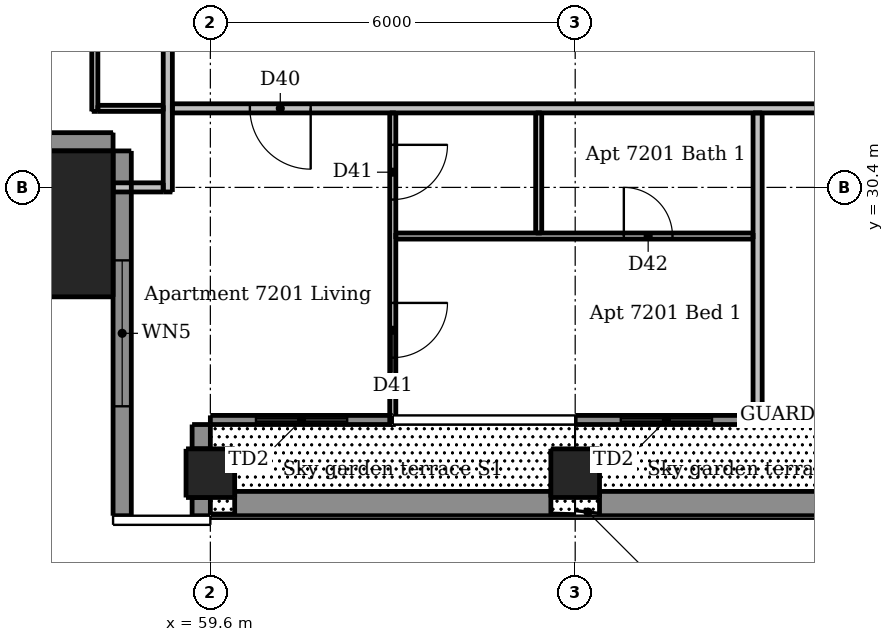
"""IFC4 building model, lengths in metres.
Left out: names, types, materials, properties, quantities, classifications, styles, units other than length and angle.
Written with IfcOpenShell. Run it as: python <this file> out.ifc"""

import sys

from ifc_helpers import new_model, si_unit, direction, frame, frame_2d, origin, origin_2d, place, context, subcontext, project, spatial, rectangle, extrude, element, fill, save


model = new_model("IFC4")
c1 = context("Model", 3, precision=1e-05, world=origin(), true_north=direction((0.0, 1.0)))
c2 = subcontext(c1, "Body", "Model", "MODEL_VIEW")
j1 = project(units=[si_unit("LENGTHUNIT", "METRE"), si_unit("PLANEANGLEUNIT", "RADIAN")], contexts=[c1])
p1 = place(None, origin())
s1 = spatial("IfcSite", under=j1, at=p1, CompositionType="ELEMENT")
p2 = place(p1, origin())
s2 = spatial("IfcBuilding", under=s1, at=p2, CompositionType="ELEMENT")
p3 = place(p2, frame((0.0, 0.0, 268.6)))
s3 = spatial("IfcBuildingStorey", under=s2, at=p3, CompositionType="ELEMENT", Elevation=268.6)
p4 = place(p3, frame((59.6, 25.7, 0.0), z_axis=(0.0, 0.0, 1.0), x_axis=(1.0, 0.0, 0.0)))
e1 = element("IfcColumn", 1, at=p4, inside=s3, PredefinedType="COLUMN", context=c2, shape_type="SweptSolid", body=[
    extrude(rectangle(XDim=0.8, YDim=0.8, at=origin_2d()), origin(), (0.0, 0.0, 1.0), 3.05),
])
p5 = place(p3, frame((65.6, 25.7, 0.0), z_axis=(0.0, 0.0, 1.0), x_axis=(1.0, 0.0, 0.0)))
e2 = element("IfcColumn", 2, at=p5, inside=s3, PredefinedType="COLUMN", context=c2, shape_type="SweptSolid", body=[
    extrude(rectangle(XDim=0.8, YDim=0.8, at=origin_2d()), origin(), (0.0, 0.0, 1.0), 3.3),
])
p6 = place(p3, frame((56.8, 29.8, 0.0), z_axis=(0.0, 0.0, 1.0), x_axis=(1.0, 0.0, 0.0)))
e3 = element("IfcColumn", 3, at=p6, inside=s3, PredefinedType="COLUMN", context=c2, shape_type="SweptSolid", body=[
    extrude(rectangle(XDim=2.4, YDim=2.4, at=origin_2d()), origin(), (0.0, 0.0, 1.0), 3.3),
])
p7 = place(p3, frame((59.45, 25.0, 0.0), z_axis=(0.0, 0.0, 1.0), x_axis=(0.0, 1.0, 0.0)))
e4 = element("IfcWall", 4, at=p7, inside=s3, PredefinedType="SOLIDWALL", context=c2, shape_type="SweptSolid", body=[
    extrude(rectangle(XDim=0.3, YDim=0.3, at=frame_2d((0.15, 0.0))), origin(), (0.0, 0.0, 1.0), 3.05),
])
p8 = place(p3, frame((59.45, 26.1, 0.0), z_axis=(0.0, 0.0, 1.0), x_axis=(0.0, 1.0, 0.0)))
e5 = element("IfcWall", 5, at=p8, inside=s3, PredefinedType="SOLIDWALL", context=c2, shape_type="SweptSolid", body=[
    extrude(rectangle(XDim=0.4, YDim=0.3, at=frame_2d((0.2, 0.0))), origin(), (0.0, 0.0, 1.0), 3.05),
])
p9 = place(p3, frame((53.0, 31.15, 0.0), z_axis=(0.0, 0.0, 1.0), x_axis=(1.0, 0.0, 0.0)))
e6 = element("IfcWall", 6, at=p9, inside=s3, PredefinedType="SOLIDWALL", context=c2, shape_type="SweptSolid", body=[
    extrude(rectangle(XDim=5.0, YDim=0.3, at=frame_2d((2.5, 0.0))), origin(), (0.0, 0.0, 1.0), 3.05),
])
p10 = place(p3, frame((58.15, 31.0, 0.0), z_axis=(0.0, 0.0, 1.0), x_axis=(0.0, -1.0, 0.0)))
e7 = element("IfcWall", 7, at=p10, inside=s3, PredefinedType="SOLIDWALL", context=c2, shape_type="SweptSolid", body=[
    extrude(rectangle(XDim=6.0, YDim=0.3, at=frame_2d((3.0, 0.0))), origin(), (0.0, 0.0, 1.0), 3.05),
])
p11 = place(p10, frame((1.8, 0.0, 0.15)))
e8 = element("IfcOpeningElement", 8, at=p11, cuts=e7, PredefinedType="OPENING", context=c2, shape_type="SweptSolid", body=[
    extrude(rectangle(XDim=2.4, YDim=2.1, at=frame_2d((1.2, 1.05))), frame((0.0, 0.16, 0.0), z_axis=(0.0, -1.0, 0.0), x_axis=(1.0, 0.0, 0.0)), (0.0, 0.0, 1.0), 0.32),
])
p12 = place(p3, frame((59.6, 26.575, 0.0), z_axis=(0.0, 0.0, 1.0), x_axis=(1.0, 0.0, 0.0)))
e9 = element("IfcWall", 9, at=p12, inside=s3, PredefinedType="SOLIDWALL", context=c2, shape_type="SweptSolid", body=[
    extrude(rectangle(XDim=3.0, YDim=0.15, at=frame_2d((1.5, 0.0))), origin(), (0.0, 0.0, 1.0), 3.05),
])
p13 = place(p12, frame((0.75, 0.0, 0.0)))
e10 = element("IfcOpeningElement", 10, at=p13, cuts=e9, PredefinedType="OPENING", context=c2, shape_type="SweptSolid", body=[
    extrude(rectangle(XDim=1.5, YDim=2.4, at=frame_2d((0.75, 1.2))), frame((0.0, 0.085, 0.0), z_axis=(0.0, -1.0, 0.0), x_axis=(1.0, 0.0, 0.0)), (0.0, 0.0, 1.0), 0.17),
])
p14 = place(p3, frame((65.6, 26.575, 0.0), z_axis=(0.0, 0.0, 1.0), x_axis=(1.0, 0.0, 0.0)))
e11 = element("IfcWall", 11, at=p14, inside=s3, PredefinedType="SOLIDWALL", context=c2, shape_type="SweptSolid", body=[
    extrude(rectangle(XDim=3.0, YDim=0.15, at=frame_2d((1.5, 0.0))), origin(), (0.0, 0.0, 1.0), 3.05),
])
p15 = place(p14, frame((0.75, 0.0, 0.0)))
e12 = element("IfcOpeningElement", 12, at=p15, cuts=e11, PredefinedType="OPENING", context=c2, shape_type="SweptSolid", body=[
    extrude(rectangle(XDim=1.5, YDim=2.4, at=frame_2d((0.75, 1.2))), frame((0.0, 0.085, 0.0), z_axis=(0.0, -1.0, 0.0), x_axis=(1.0, 0.0, 0.0)), (0.0, 0.0, 1.0), 0.17),
])
for number, where, z_axis, x_axis in (
    (13, (60.0, 25.2, 0.03), (0.0, 0.0, 1.0), (1.0, 0.0, 0.0)),
    (14, (66.0, 25.2, 0.03), (0.0, 0.0, 1.0), (1.0, 0.0, 0.0)),
):
    element("IfcWall", number, at=place(p3, frame(where, z_axis=z_axis, x_axis=x_axis)), inside=s3, PredefinedType="PARAPET", context=c2, shape_type="SweptSolid", body=[
        extrude(rectangle(XDim=5.2, YDim=0.4, at=frame_2d((2.6, 0.0))), origin(), (0.0, 0.0, 1.0), 1.1),
    ])
p16 = place(p3, frame((57.7, 31.65, 0.0), z_axis=(0.0, 0.0, 1.0), x_axis=(0.0, 1.0, 0.0)))
e15 = element("IfcWall", 15, at=p16, inside=s3, PredefinedType="PARTITIONING", context=c2, shape_type="SweptSolid", body=[
    extrude(rectangle(XDim=16.675, YDim=0.1, at=frame_2d((8.337, 0.0))), origin(), (0.0, 0.0, 1.0), 3.05),
])
p17 = place(p16, frame((2.55, 0.0, 0.0)))
e16 = element("IfcOpeningElement", 16, at=p17, cuts=e15, PredefinedType="OPENING", context=c2, shape_type="SweptSolid", body=[
    extrude(rectangle(XDim=0.9, YDim=2.1, at=frame_2d((0.45, 1.05))), frame((0.0, 0.06, 0.0), z_axis=(0.0, -1.0, 0.0), x_axis=(1.0, 0.0, 0.0)), (0.0, 0.0, 1.0), 0.12),
])
p18 = place(p16, frame((8.8, 0.0, 0.0)))
e17 = element("IfcOpeningElement", 17, at=p18, cuts=e15, PredefinedType="OPENING", context=c2, shape_type="SweptSolid", body=[
    extrude(rectangle(XDim=0.9, YDim=2.1, at=frame_2d((0.45, 1.05))), frame((0.0, 0.06, 0.0), z_axis=(0.0, -1.0, 0.0), x_axis=(1.0, 0.0, 0.0)), (0.0, 0.0, 1.0), 0.12),
])
p19 = place(p16, frame((6.4, 0.0, 0.0)))
e18 = element("IfcOpeningElement", 18, at=p19, cuts=e15, PredefinedType="OPENING", context=c2, shape_type="SweptSolid", body=[
    extrude(rectangle(XDim=0.9, YDim=2.1, at=frame_2d((0.45, 1.05))), frame((0.0, 0.06, 0.0), z_axis=(0.0, -1.0, 0.0), x_axis=(1.0, 0.0, 0.0)), (0.0, 0.0, 1.0), 0.12),
])
p20 = place(p16, frame((14.5, 0.0, 0.0)))
e19 = element("IfcOpeningElement", 19, at=p20, cuts=e15, PredefinedType="OPENING", context=c2, shape_type="SweptSolid", body=[
    extrude(rectangle(XDim=0.9, YDim=2.1, at=frame_2d((0.45, 1.05))), frame((0.0, 0.06, 0.0), z_axis=(0.0, -1.0, 0.0), x_axis=(1.0, 0.0, 0.0)), (0.0, 0.0, 1.0), 0.12),
])
p21 = place(p16, frame((11.55, 0.0, 0.0)))
e20 = element("IfcOpeningElement", 20, at=p21, cuts=e15, PredefinedType="OPENING", context=c2, shape_type="SweptSolid", body=[
    extrude(rectangle(XDim=0.8, YDim=2.1, at=frame_2d((0.4, 1.05))), frame((0.0, 0.06, 0.0), z_axis=(0.0, -1.0, 0.0), x_axis=(1.0, 0.0, 0.0)), (0.0, 0.0, 1.0), 0.12),
])
p22 = place(p3, frame((62.6, 31.625, 0.0), z_axis=(0.0, 0.0, 1.0), x_axis=(0.0, -1.0, 0.0)))
e21 = element("IfcWall", 21, at=p22, inside=s3, PredefinedType="PARTITIONING", context=c2, shape_type="SweptSolid", body=[
    extrude(rectangle(XDim=5.125, YDim=0.1, at=frame_2d((2.562, 0.0))), origin(), (0.0, 0.0, 1.0), 3.05),
])
p23 = place(p22, frame((0.525, 0.0, 0.0)))
e22 = element("IfcOpeningElement", 22, at=p23, cuts=e21, PredefinedType="OPENING", context=c2, shape_type="SweptSolid", body=[
    extrude(rectangle(XDim=0.9, YDim=2.1, at=frame_2d((0.45, 1.05))), frame((0.0, 0.06, 0.0), z_axis=(0.0, -1.0, 0.0), x_axis=(1.0, 0.0, 0.0)), (0.0, 0.0, 1.0), 0.12),
])
p24 = place(p22, frame((3.125, 0.0, 0.0)))
e23 = element("IfcOpeningElement", 23, at=p24, cuts=e21, PredefinedType="OPENING", context=c2, shape_type="SweptSolid", body=[
    extrude(rectangle(XDim=0.9, YDim=2.1, at=frame_2d((0.45, 1.05))), frame((0.0, 0.06, 0.0), z_axis=(0.0, -1.0, 0.0), x_axis=(1.0, 0.0, 0.0)), (0.0, 0.0, 1.0), 0.12),
])
p25 = place(p3, frame((65.0, 29.65, 0.0), z_axis=(0.0, 0.0, 1.0), x_axis=(0.0, 1.0, 0.0)))
e24 = element("IfcWall", 24, at=p25, inside=s3, PredefinedType="PARTITIONING", context=c2, shape_type="SweptSolid", body=[
    extrude(rectangle(XDim=1.975, YDim=0.1, at=frame_2d((0.988, 0.0))), origin(), (0.0, 0.0, 1.0), 3.05),
])
p26 = place(p3, frame((57.75, 31.7, 0.0), z_axis=(0.0, 0.0, 1.0), x_axis=(1.0, 0.0, 0.0)))
e25 = element("IfcWall", 25, at=p26, inside=s3, PredefinedType="PARTITIONING", context=c2, shape_type="SweptSolid", body=[
    extrude(rectangle(XDim=1.075, YDim=0.1, at=frame_2d((0.538, 0.0))), origin(), (0.0, 0.0, 1.0), 3.05),
])
p27 = place(p3, frame((62.65, 29.6, 0.0), z_axis=(0.0, 0.0, 1.0), x_axis=(1.0, 0.0, 0.0)))
e26 = element("IfcWall", 26, at=p27, inside=s3, PredefinedType="PARTITIONING", context=c2, shape_type="SweptSolid", body=[
    extrude(rectangle(XDim=5.875, YDim=0.1, at=frame_2d((2.938, 0.0))), origin(), (0.0, 0.0, 1.0), 3.05),
])
p28 = place(p27, frame((3.75, 0.0, 0.0)))
e27 = element("IfcOpeningElement", 27, at=p28, cuts=e26, PredefinedType="OPENING", context=c2, shape_type="SweptSolid", body=[
    extrude(rectangle(XDim=0.8, YDim=2.1, at=frame_2d((0.4, 1.05))), frame((0.0, 0.06, 0.0), z_axis=(0.0, -1.0, 0.0), x_axis=(1.0, 0.0, 0.0)), (0.0, 0.0, 1.0), 0.12),
])
p29 = place(p3, frame((58.9, 30.325, 0.0), z_axis=(0.0, 0.0, 1.0), x_axis=(0.0, 1.0, 0.0)))
e28 = element("IfcWall", 28, at=p29, inside=s3, PredefinedType="PARTITIONING", context=c2, shape_type="SweptSolid", body=[
    extrude(rectangle(XDim=30.85, YDim=0.15, at=frame_2d((15.425, 0.0))), origin(), (0.0, 0.0, 1.0), 3.05),
])
p30 = place(p29, frame((9.225, 0.0, 0.0)))
e29 = element("IfcOpeningElement", 29, at=p30, cuts=e28, PredefinedType="OPENING", context=c2, shape_type="SweptSolid", body=[
    extrude(rectangle(XDim=1.0, YDim=2.1, at=frame_2d((0.5, 1.05))), frame((0.0, 0.085, 0.0), z_axis=(0.0, -1.0, 0.0), x_axis=(1.0, 0.0, 0.0)), (0.0, 0.0, 1.0), 0.17),
])
p31 = place(p29, frame((26.925, 0.0, 0.0)))
e30 = element("IfcOpeningElement", 30, at=p31, cuts=e28, PredefinedType="OPENING", context=c2, shape_type="SweptSolid", body=[
    extrude(rectangle(XDim=1.0, YDim=2.1, at=frame_2d((0.5, 1.05))), frame((0.0, 0.085, 0.0), z_axis=(0.0, -1.0, 0.0), x_axis=(1.0, 0.0, 0.0)), (0.0, 0.0, 1.0), 0.17),
])
p32 = place(p3, frame((68.6, 26.5, 0.0), z_axis=(0.0, 0.0, 1.0), x_axis=(0.0, 1.0, 0.0)))
e31 = element("IfcWall", 31, at=p32, inside=s3, PredefinedType="PARTITIONING", context=c2, shape_type="SweptSolid", body=[
    extrude(rectangle(XDim=5.125, YDim=0.15, at=frame_2d((2.562, 0.0))), origin(), (0.0, 0.0, 1.0), 3.05),
])
p33 = place(p3, frame((89.525, 31.7, 0.0), z_axis=(0.0, 0.0, 1.0), x_axis=(-1.0, 0.0, 0.0)))
e32 = element("IfcWall", 32, at=p33, inside=s3, PredefinedType="PARTITIONING", context=c2, shape_type="SweptSolid", body=[
    extrude(rectangle(XDim=30.55, YDim=0.15, at=frame_2d((15.275, 0.0))), origin(), (0.0, 0.0, 1.0), 3.05),
])
p34 = place(p33, frame((28.275, 0.0, 0.0)))
e33 = element("IfcOpeningElement", 33, at=p34, cuts=e32, PredefinedType="OPENING", context=c2, shape_type="SweptSolid", body=[
    extrude(rectangle(XDim=1.0, YDim=2.1, at=frame_2d((0.5, 1.05))), frame((0.0, 0.085, 0.0), z_axis=(0.0, -1.0, 0.0), x_axis=(1.0, 0.0, 0.0)), (0.0, 0.0, 1.0), 0.17),
])
p35 = place(p33, frame((11.425, 0.0, 0.0)))
e34 = element("IfcOpeningElement", 34, at=p35, cuts=e32, PredefinedType="OPENING", context=c2, shape_type="SweptSolid", body=[
    extrude(rectangle(XDim=1.0, YDim=2.1, at=frame_2d((0.5, 1.05))), frame((0.0, 0.085, 0.0), z_axis=(0.0, -1.0, 0.0), x_axis=(1.0, 0.0, 0.0)), (0.0, 0.0, 1.0), 0.17),
])
p36 = place(p3, frame((58.0, 30.4, 0.0), z_axis=(0.0, 0.0, 1.0), x_axis=(1.0, 0.0, 0.0)))
e35 = element("IfcWall", 35, at=p36, inside=s3, PredefinedType="PARTITIONING", context=c2, shape_type="SweptSolid", body=[
    extrude(rectangle(XDim=0.825, YDim=0.15, at=frame_2d((0.413, 0.0))), origin(), (0.0, 0.0, 1.0), 3.05),
])
p37 = place(p11, origin())
e36 = element("IfcWindow", 36, at=p37, inside=s3, PartitioningType="DOUBLE_PANEL_VERTICAL", PredefinedType="WINDOW", context=c2, shape_type="SweptSolid", body=[
    extrude(rectangle(XDim=2.4, YDim=2.1, at=frame_2d((1.2, 1.05))), frame((0.0, 0.03, 0.0), z_axis=(0.0, -1.0, 0.0), x_axis=(1.0, 0.0, 0.0)), (0.0, 0.0, 1.0), 0.06),
])
fill(e8, e36)
p38 = place(p13, origin())
e37 = element("IfcDoor", 37, at=p38, inside=s3, OperationType="DOUBLE_DOOR_SLIDING", PredefinedType="DOOR", context=c2, shape_type="SweptSolid", body=[
    extrude(rectangle(XDim=1.5, YDim=2.4, at=frame_2d((0.75, 1.2))), frame((0.0, 0.025, 0.0), z_axis=(0.0, -1.0, 0.0), x_axis=(1.0, 0.0, 0.0)), (0.0, 0.0, 1.0), 0.05),
])
fill(e10, e37)
p39 = place(p15, origin())
e38 = element("IfcDoor", 38, at=p39, inside=s3, OperationType="DOUBLE_DOOR_SLIDING", PredefinedType="DOOR", context=c2, shape_type="SweptSolid", body=[
    extrude(rectangle(XDim=1.5, YDim=2.4, at=frame_2d((0.75, 1.2))), frame((0.0, 0.025, 0.0), z_axis=(0.0, -1.0, 0.0), x_axis=(1.0, 0.0, 0.0)), (0.0, 0.0, 1.0), 0.05),
])
fill(e12, e38)
p40 = place(p34, origin())
e39 = element("IfcDoor", 39, at=p40, inside=s3, OperationType="SINGLE_SWING_LEFT", PredefinedType="DOOR", context=c2, shape_type="SweptSolid", body=[
    extrude(rectangle(XDim=1.0, YDim=2.1, at=frame_2d((0.5, 1.05))), frame((0.0, 0.025, 0.0), z_axis=(0.0, -1.0, 0.0), x_axis=(1.0, 0.0, 0.0)), (0.0, 0.0, 1.0), 0.05),
])
fill(e33, e39)
p41 = place(p23, origin())
e40 = element("IfcDoor", 40, at=p41, inside=s3, OperationType="SINGLE_SWING_LEFT", PredefinedType="DOOR", context=c2, shape_type="SweptSolid", body=[
    extrude(rectangle(XDim=0.9, YDim=2.1, at=frame_2d((0.45, 1.05))), frame((0.0, 0.025, 0.0), z_axis=(0.0, -1.0, 0.0), x_axis=(1.0, 0.0, 0.0)), (0.0, 0.0, 1.0), 0.05),
])
fill(e22, e40)
p42 = place(p24, origin())
e41 = element("IfcDoor", 41, at=p42, inside=s3, OperationType="SINGLE_SWING_LEFT", PredefinedType="DOOR", context=c2, shape_type="SweptSolid", body=[
    extrude(rectangle(XDim=0.9, YDim=2.1, at=frame_2d((0.45, 1.05))), frame((0.0, 0.025, 0.0), z_axis=(0.0, -1.0, 0.0), x_axis=(1.0, 0.0, 0.0)), (0.0, 0.0, 1.0), 0.05),
])
fill(e23, e41)
p43 = place(p28, origin())
e42 = element("IfcDoor", 42, at=p43, inside=s3, OperationType="SINGLE_SWING_LEFT", PredefinedType="DOOR", context=c2, shape_type="SweptSolid", body=[
    extrude(rectangle(XDim=0.8, YDim=2.1, at=frame_2d((0.4, 1.05))), frame((0.0, 0.025, 0.0), z_axis=(0.0, -1.0, 0.0), x_axis=(1.0, 0.0, 0.0)), (0.0, 0.0, 1.0), 0.05),
])
fill(e27, e42)
save(model, sys.argv[1])
